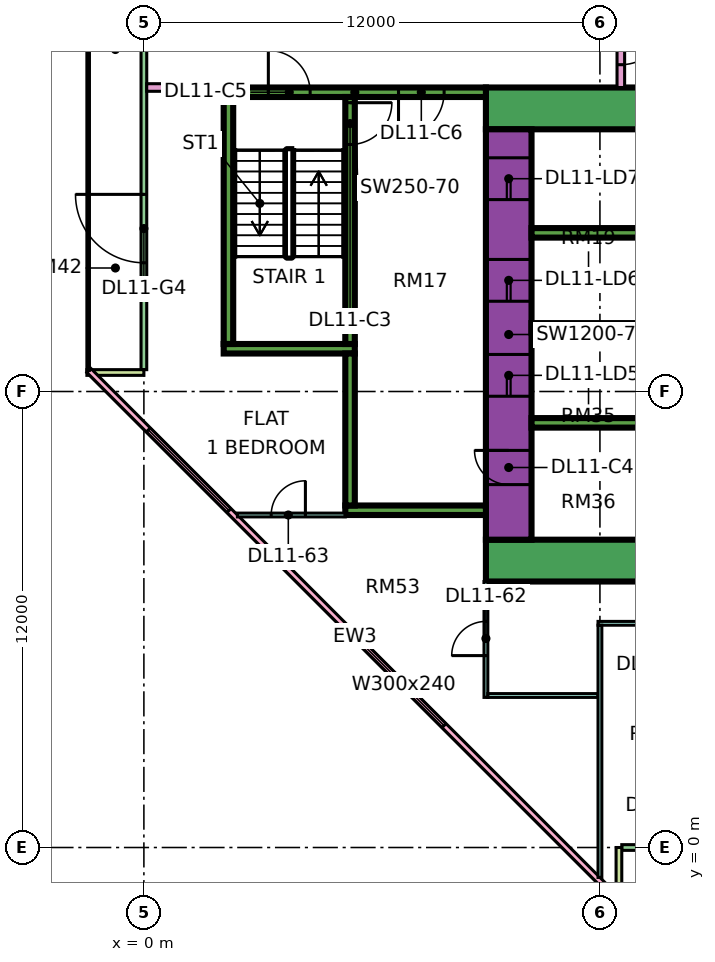
"""IFC4 building model, lengths in metres.
Left out: names, types, materials, properties, quantities, classifications, styles, units other than length and angle.
Written with IfcOpenShell. Run it as: python <this file> out.ifc"""

import sys

from ifc_helpers import new_model, si_unit, direction, frame, frame_2d, origin, place, context, subcontext, project, spatial, rectangle, extrude, element, fill, save


model = new_model("IFC4")
c1 = context("Model", 3, precision=1e-05, world=origin(), true_north=direction((0.0, 1.0)))
c2 = subcontext(c1, "Body", "Model", "MODEL_VIEW")
j1 = project(units=[si_unit("LENGTHUNIT", "METRE"), si_unit("PLANEANGLEUNIT", "RADIAN")], contexts=[c1])
p1 = place(None, origin())
s1 = spatial("IfcSite", under=j1, at=p1, CompositionType="ELEMENT")
p2 = place(p1, origin())
s2 = spatial("IfcBuilding", under=s1, at=p2, CompositionType="ELEMENT")
p3 = place(p2, frame((0.0, 0.0, 56.4)))
s3 = spatial("IfcBuildingStorey", under=s2, at=p3, CompositionType="ELEMENT", Elevation=56.4)
p4 = place(p3, frame((9.0, 7.55, 0.0), z_axis=(0.0, 0.0, 1.0), x_axis=(1.0, 0.0, 0.0)))
e1 = element("IfcWall", 1, at=p4, inside=s3, PredefinedType="SHEAR", context=c2, shape_type="SweptSolid", body=[
    extrude(rectangle(XDim=25.0, YDim=1.1, at=frame_2d((12.5, 0.0))), origin(), (0.0, 0.0, 1.0), 3.75),
])
p5 = place(p3, frame((9.0, 19.45, 0.0), z_axis=(0.0, 0.0, 1.0), x_axis=(1.0, 0.0, 0.0)))
e2 = element("IfcWall", 2, at=p5, inside=s3, PredefinedType="SHEAR", context=c2, shape_type="SweptSolid", body=[
    extrude(rectangle(XDim=25.0, YDim=1.1, at=frame_2d((12.5, 0.0))), origin(), (0.0, 0.0, 1.0), 3.75),
])
p6 = place(p5, frame((19.1, 0.0, 0.0)))
e3 = element("IfcOpeningElement", 3, at=p6, cuts=e2, PredefinedType="OPENING", context=c2, shape_type="SweptSolid", body=[
    extrude(rectangle(XDim=1.8, YDim=2.4, at=frame_2d((0.9, 1.2))), frame((0.0, 0.56, 0.0), z_axis=(0.0, -1.0, 0.0), x_axis=(1.0, 0.0, 0.0)), (0.0, 0.0, 1.0), 1.12),
])
p7 = place(p3, frame((9.6, 8.1, 0.0), z_axis=(0.0, 0.0, 1.0), x_axis=(0.0, 1.0, 0.0)))
e4 = element("IfcWall", 4, at=p7, inside=s3, PredefinedType="SHEAR", context=c2, shape_type="SweptSolid", body=[
    extrude(rectangle(XDim=10.8, YDim=1.2, at=frame_2d((5.4, 0.0))), origin(), (0.0, 0.0, 1.0), 3.75),
])
p8 = place(p7, frame((3.775, 0.0, 0.0)))
e5 = element("IfcOpeningElement", 5, at=p8, cuts=e4, PredefinedType="OPENING", context=c2, shape_type="SweptSolid", body=[
    extrude(rectangle(XDim=1.1, YDim=2.2, at=frame_2d((0.55, 1.1))), frame((0.0, 0.61, 0.0), z_axis=(0.0, -1.0, 0.0), x_axis=(1.0, 0.0, 0.0)), (0.0, 0.0, 1.0), 1.22),
])
p9 = place(p7, frame((6.275, 0.0, 0.0)))
e6 = element("IfcOpeningElement", 6, at=p9, cuts=e4, PredefinedType="OPENING", context=c2, shape_type="SweptSolid", body=[
    extrude(rectangle(XDim=1.1, YDim=2.2, at=frame_2d((0.55, 1.1))), frame((0.0, 0.61, 0.0), z_axis=(0.0, -1.0, 0.0), x_axis=(1.0, 0.0, 0.0)), (0.0, 0.0, 1.0), 1.22),
])
p10 = place(p7, frame((8.95, 0.0, 0.0)))
e7 = element("IfcOpeningElement", 7, at=p10, cuts=e4, PredefinedType="OPENING", context=c2, shape_type="SweptSolid", body=[
    extrude(rectangle(XDim=1.1, YDim=2.2, at=frame_2d((0.55, 1.1))), frame((0.0, 0.61, 0.0), z_axis=(0.0, -1.0, 0.0), x_axis=(1.0, 0.0, 0.0)), (0.0, 0.0, 1.0), 1.22),
])
p11 = place(p7, frame((1.45, 0.0, 0.0)))
e8 = element("IfcOpeningElement", 8, at=p11, cuts=e4, PredefinedType="OPENING", context=c2, shape_type="SweptSolid", body=[
    extrude(rectangle(XDim=0.9, YDim=2.1, at=frame_2d((0.45, 1.05))), frame((0.0, 0.61, 0.0), z_axis=(0.0, -1.0, 0.0), x_axis=(1.0, 0.0, 0.0)), (0.0, 0.0, 1.0), 1.22),
])
for number, where, z_axis, x_axis in (
    (9, (10.2, 11.175, 0.0), (0.0, 0.0, 1.0), (1.0, 0.0, 0.0)),
    (10, (10.2, 13.675, 0.0), (0.0, 0.0, 1.0), (1.0, 0.0, 0.0)),
    (11, (10.2, 16.175, 0.0), (0.0, 0.0, 1.0), (1.0, 0.0, 0.0)),
):
    element("IfcWall", number, at=place(p3, frame(where, z_axis=z_axis, x_axis=x_axis)), inside=s3, PredefinedType="SHEAR", context=c2, shape_type="SweptSolid", body=[
        extrude(rectangle(XDim=3.0, YDim=0.25, at=frame_2d((1.5, 0.0))), origin(), (0.0, 0.0, 1.0), 3.75),
    ])
p12 = place(p3, frame((2.1, 19.875, 0.0), z_axis=(0.0, 0.0, 1.0), x_axis=(1.0, 0.0, 0.0)))
e12 = element("IfcWall", 12, at=p12, inside=s3, PredefinedType="SHEAR", context=c2, shape_type="SweptSolid", body=[
    extrude(rectangle(XDim=6.9, YDim=0.25, at=frame_2d((3.45, 0.0))), origin(), (0.0, 0.0, 1.0), 3.75),
])
p13 = place(p12, frame((1.175, 0.0, 0.0)))
e13 = element("IfcOpeningElement", 13, at=p13, cuts=e12, PredefinedType="OPENING", context=c2, shape_type="SweptSolid", body=[
    extrude(rectangle(XDim=1.1, YDim=2.2, at=frame_2d((0.55, 1.1))), frame((0.0, 0.135, 0.0), z_axis=(0.0, -1.0, 0.0), x_axis=(1.0, 0.0, 0.0)), (0.0, 0.0, 1.0), 0.27),
])
p14 = place(p12, frame((4.6, 0.0, 0.0)))
e14 = element("IfcOpeningElement", 14, at=p14, cuts=e12, PredefinedType="OPENING", context=c2, shape_type="SweptSolid", body=[
    extrude(rectangle(XDim=1.2, YDim=2.2, at=frame_2d((0.6, 1.1))), frame((0.0, 0.135, 0.0), z_axis=(0.0, -1.0, 0.0), x_axis=(1.0, 0.0, 0.0)), (0.0, 0.0, 1.0), 0.27),
])
p15 = place(p3, frame((2.1, 13.125, 0.0), z_axis=(0.0, 0.0, 1.0), x_axis=(1.0, 0.0, 0.0)))
e15 = element("IfcWall", 15, at=p15, inside=s3, PredefinedType="SHEAR", context=c2, shape_type="SweptSolid", body=[
    extrude(rectangle(XDim=3.45, YDim=0.25, at=frame_2d((1.725, 0.0))), origin(), (0.0, 0.0, 1.0), 3.75),
])
p16 = place(p3, frame((2.225, 13.25, 0.0), z_axis=(0.0, 0.0, 1.0), x_axis=(0.0, 1.0, 0.0)))
e16 = element("IfcWall", 16, at=p16, inside=s3, PredefinedType="SHEAR", context=c2, shape_type="SweptSolid", body=[
    extrude(rectangle(XDim=6.5, YDim=0.25, at=frame_2d((3.25, 0.0))), origin(), (0.0, 0.0, 1.0), 3.75),
])
p17 = place(p3, frame((5.425, 13.25, 0.0), z_axis=(0.0, 0.0, 1.0), x_axis=(0.0, 1.0, 0.0)))
e17 = element("IfcWall", 17, at=p17, inside=s3, PredefinedType="SHEAR", context=c2, shape_type="SweptSolid", body=[
    extrude(rectangle(XDim=6.5, YDim=0.25, at=frame_2d((3.25, 0.0))), origin(), (0.0, 0.0, 1.0), 3.75),
])
p18 = place(p17, frame((5.25, 0.0, 0.0)))
e18 = element("IfcOpeningElement", 18, at=p18, cuts=e17, PredefinedType="OPENING", context=c2, shape_type="SweptSolid", body=[
    extrude(rectangle(XDim=1.1, YDim=2.2, at=frame_2d((0.55, 1.1))), frame((0.0, 0.135, 0.0), z_axis=(0.0, -1.0, 0.0), x_axis=(1.0, 0.0, 0.0)), (0.0, 0.0, 1.0), 0.27),
])
p19 = place(p3, frame((5.3, 8.875, 0.0), z_axis=(0.0, 0.0, 1.0), x_axis=(1.0, 0.0, 0.0)))
e19 = element("IfcWall", 19, at=p19, inside=s3, PredefinedType="SHEAR", context=c2, shape_type="SweptSolid", body=[
    extrude(rectangle(XDim=3.7, YDim=0.25, at=frame_2d((1.85, 0.0))), origin(), (0.0, 0.0, 1.0), 3.75),
])
p20 = place(p3, frame((5.425, 9.0, 0.0), z_axis=(0.0, 0.0, 1.0), x_axis=(0.0, 1.0, 0.0)))
e20 = element("IfcWall", 20, at=p20, inside=s3, PredefinedType="SHEAR", context=c2, shape_type="SweptSolid", body=[
    extrude(rectangle(XDim=4.0, YDim=0.25, at=frame_2d((2.0, 0.0))), origin(), (0.0, 0.0, 1.0), 3.75),
])
p21 = place(p3, frame((0.0, 23.925, 0.0), z_axis=(0.0, 0.0, 1.0), x_axis=(0.0, -1.0, 0.0)))
e21 = element("IfcWall", 21, at=p21, inside=s3, PredefinedType="SOLIDWALL", context=c2, shape_type="SweptSolid", body=[
    extrude(rectangle(XDim=11.35, YDim=0.15, at=frame_2d((5.675, 0.0))), origin(), (0.0, 0.0, 1.0), 3.35),
])
p22 = place(p21, frame((6.738, 0.0, 0.0)))
e22 = element("IfcOpeningElement", 22, at=p22, cuts=e21, PredefinedType="OPENING", context=c2, shape_type="SweptSolid", body=[
    extrude(rectangle(XDim=1.8, YDim=2.4, at=frame_2d((0.9, 1.2))), frame((0.0, 0.085, 0.0), z_axis=(0.0, -1.0, 0.0), x_axis=(1.0, 0.0, 0.0)), (0.0, 0.0, 1.0), 0.17),
])
p23 = place(p3, frame((-1.5, 12.5, 0.0), z_axis=(0.0, 0.0, 1.0), x_axis=(1.0, 0.0, 0.0)))
e23 = element("IfcWall", 23, at=p23, inside=s3, PredefinedType="SOLIDWALL", context=c2, shape_type="SweptSolid", body=[
    extrude(rectangle(XDim=1.5, YDim=0.15, at=frame_2d((0.75, 0.0))), origin(), (0.0, 0.0, 1.0), 3.35),
])
p24 = place(p3, frame((-1.447, 12.553, 0.0), z_axis=(0.0, 0.0, 1.0), x_axis=(0.707106781187, -0.707106781187, 0.0)))
e24 = element("IfcWall", 24, at=p24, inside=s3, PredefinedType="SOLIDWALL", context=c2, shape_type="SweptSolid", body=[
    extrude(rectangle(XDim=19.799, YDim=0.15, at=frame_2d((9.899, 0.0))), origin(), (0.0, 0.0, 1.0), 3.35),
])
p25 = place(p24, frame((2.212, 0.0, 0.45)))
e25 = element("IfcOpeningElement", 25, at=p25, cuts=e24, PredefinedType="OPENING", context=c2, shape_type="SweptSolid", body=[
    extrude(rectangle(XDim=3.0, YDim=2.4, at=frame_2d((1.5, 1.2))), frame((0.0, 0.085, 0.0), z_axis=(0.0, -1.0, 0.0), x_axis=(1.0, 0.0, 0.0)), (0.0, 0.0, 1.0), 0.17),
])
p26 = place(p24, frame((10.216, 0.0, 0.45)))
e26 = element("IfcOpeningElement", 26, at=p26, cuts=e24, PredefinedType="OPENING", context=c2, shape_type="SweptSolid", body=[
    extrude(rectangle(XDim=3.0, YDim=2.4, at=frame_2d((1.5, 1.2))), frame((0.0, 0.085, 0.0), z_axis=(0.0, -1.0, 0.0), x_axis=(1.0, 0.0, 0.0)), (0.0, 0.0, 1.0), 0.17),
])
p27 = place(p3, frame((12.575, 0.0, 0.0), z_axis=(0.0, 0.0, 1.0), x_axis=(1.0, 0.0, 0.0)))
e27 = element("IfcWall", 27, at=p27, inside=s3, PredefinedType="SOLIDWALL", context=c2, shape_type="SweptSolid", body=[
    extrude(rectangle(XDim=11.35, YDim=0.15, at=frame_2d((5.675, 0.0))), origin(), (0.0, 0.0, 1.0), 3.35),
])
p28 = place(p27, frame((0.613, 0.0, 0.0)))
e28 = element("IfcOpeningElement", 28, at=p28, cuts=e27, PredefinedType="OPENING", context=c2, shape_type="SweptSolid", body=[
    extrude(rectangle(XDim=1.2, YDim=2.4, at=frame_2d((0.6, 1.2))), frame((0.0, 0.085, 0.0), z_axis=(0.0, -1.0, 0.0), x_axis=(1.0, 0.0, 0.0)), (0.0, 0.0, 1.0), 0.17),
])
p29 = place(p27, frame((3.025, 0.0, 0.45)))
e29 = element("IfcOpeningElement", 29, at=p29, cuts=e27, PredefinedType="OPENING", context=c2, shape_type="SweptSolid", body=[
    extrude(rectangle(XDim=1.8, YDim=2.4, at=frame_2d((0.9, 1.2))), frame((0.0, 0.085, 0.0), z_axis=(0.0, -1.0, 0.0), x_axis=(1.0, 0.0, 0.0)), (0.0, 0.0, 1.0), 0.17),
])
p30 = place(p27, frame((6.025, 0.0, 0.45)))
e30 = element("IfcOpeningElement", 30, at=p30, cuts=e27, PredefinedType="OPENING", context=c2, shape_type="SweptSolid", body=[
    extrude(rectangle(XDim=1.8, YDim=2.4, at=frame_2d((0.9, 1.2))), frame((0.0, 0.085, 0.0), z_axis=(0.0, -1.0, 0.0), x_axis=(1.0, 0.0, 0.0)), (0.0, 0.0, 1.0), 0.17),
])
p31 = place(p27, frame((9.0, 0.0, 0.45)))
e31 = element("IfcOpeningElement", 31, at=p31, cuts=e27, PredefinedType="OPENING", context=c2, shape_type="SweptSolid", body=[
    extrude(rectangle(XDim=1.2, YDim=2.4, at=frame_2d((0.6, 1.2))), frame((0.0, 0.085, 0.0), z_axis=(0.0, -1.0, 0.0), x_axis=(1.0, 0.0, 0.0)), (0.0, 0.0, 1.0), 0.17),
])
p32 = place(p3, frame((12.5, -1.5, 0.0), z_axis=(0.0, 0.0, 1.0), x_axis=(0.0, 1.0, 0.0)))
e32 = element("IfcWall", 32, at=p32, inside=s3, PredefinedType="SOLIDWALL", context=c2, shape_type="SweptSolid", body=[
    extrude(rectangle(XDim=1.5, YDim=0.15, at=frame_2d((0.75, 0.0))), origin(), (0.0, 0.0, 1.0), 3.35),
])
p33 = place(p3, frame((0.074, 20.0, 0.0), z_axis=(0.0, 0.0, 1.0), x_axis=(1.0, 0.0, 0.0)))
e33 = element("IfcWall", 33, at=p33, inside=s3, PredefinedType="PARTITIONING", context=c2, shape_type="SweptSolid", body=[
    extrude(rectangle(XDim=2.026, YDim=0.2, at=frame_2d((1.013, 0.0))), origin(), (0.0, 0.0, 1.0), 3.35),
])
p34 = place(p3, frame((2.461, 8.75, 0.0), z_axis=(0.0, 0.0, 1.0), x_axis=(1.0, 0.0, 0.0)))
e34 = element("IfcWall", 34, at=p34, inside=s3, PredefinedType="PARTITIONING", context=c2, shape_type="SweptSolid", body=[
    extrude(rectangle(XDim=2.839, YDim=0.1, at=frame_2d((1.419, 0.0))), origin(), (0.0, 0.0, 1.0), 3.35),
])
p35 = place(p34, frame((0.889, 0.0, 0.0)))
e35 = element("IfcOpeningElement", 35, at=p35, cuts=e34, PredefinedType="OPENING", context=c2, shape_type="SweptSolid", body=[
    extrude(rectangle(XDim=0.9, YDim=2.1, at=frame_2d((0.45, 1.05))), frame((0.0, 0.06, 0.0), z_axis=(0.0, -1.0, 0.0), x_axis=(1.0, 0.0, 0.0)), (0.0, 0.0, 1.0), 0.12),
])
p36 = place(p3, frame((9.0, 3.95, 0.0), z_axis=(0.0, 0.0, 1.0), x_axis=(0.0, 1.0, 0.0)))
e36 = element("IfcWall", 36, at=p36, inside=s3, PredefinedType="PARTITIONING", context=c2, shape_type="SweptSolid", body=[
    extrude(rectangle(XDim=3.05, YDim=0.1, at=frame_2d((1.525, 0.0))), origin(), (0.0, 0.0, 1.0), 3.35),
])
p37 = place(p36, frame((1.1, 0.0, 0.0)))
e37 = element("IfcOpeningElement", 37, at=p37, cuts=e36, PredefinedType="OPENING", context=c2, shape_type="SweptSolid", body=[
    extrude(rectangle(XDim=0.9, YDim=2.1, at=frame_2d((0.45, 1.05))), frame((0.0, 0.06, 0.0), z_axis=(0.0, -1.0, 0.0), x_axis=(1.0, 0.0, 0.0)), (0.0, 0.0, 1.0), 0.12),
])
p38 = place(p3, frame((9.05, 4.0, 0.0), z_axis=(0.0, 0.0, 1.0), x_axis=(1.0, 0.0, 0.0)))
e38 = element("IfcWall", 38, at=p38, inside=s3, PredefinedType="PARTITIONING", context=c2, shape_type="SweptSolid", body=[
    extrude(rectangle(XDim=2.9, YDim=0.1, at=frame_2d((1.45, 0.0))), origin(), (0.0, 0.0, 1.0), 3.35),
])
p39 = place(p3, frame((11.95, 5.9, 0.0), z_axis=(0.0, 0.0, 1.0), x_axis=(1.0, 0.0, 0.0)))
e39 = element("IfcWall", 39, at=p39, inside=s3, PredefinedType="PARTITIONING", context=c2, shape_type="SweptSolid", body=[
    extrude(rectangle(XDim=21.1, YDim=0.1, at=frame_2d((10.55, 0.0))), origin(), (0.0, 0.0, 1.0), 3.35),
])
p40 = place(p39, frame((1.1, 0.0, 0.0)))
e40 = element("IfcOpeningElement", 40, at=p40, cuts=e39, PredefinedType="OPENING", context=c2, shape_type="SweptSolid", body=[
    extrude(rectangle(XDim=0.9, YDim=2.1, at=frame_2d((0.45, 1.05))), frame((0.0, 0.06, 0.0), z_axis=(0.0, -1.0, 0.0), x_axis=(1.0, 0.0, 0.0)), (0.0, 0.0, 1.0), 0.12),
])
p41 = place(p39, frame((4.1, 0.0, 0.0)))
e41 = element("IfcOpeningElement", 41, at=p41, cuts=e39, PredefinedType="OPENING", context=c2, shape_type="SweptSolid", body=[
    extrude(rectangle(XDim=0.9, YDim=2.1, at=frame_2d((0.45, 1.05))), frame((0.0, 0.06, 0.0), z_axis=(0.0, -1.0, 0.0), x_axis=(1.0, 0.0, 0.0)), (0.0, 0.0, 1.0), 0.12),
])
p42 = place(p39, frame((7.1, 0.0, 0.0)))
e42 = element("IfcOpeningElement", 42, at=p42, cuts=e39, PredefinedType="OPENING", context=c2, shape_type="SweptSolid", body=[
    extrude(rectangle(XDim=0.9, YDim=2.1, at=frame_2d((0.45, 1.05))), frame((0.0, 0.06, 0.0), z_axis=(0.0, -1.0, 0.0), x_axis=(1.0, 0.0, 0.0)), (0.0, 0.0, 1.0), 0.12),
])
p43 = place(p39, frame((10.1, 0.0, 0.0)))
e43 = element("IfcOpeningElement", 43, at=p43, cuts=e39, PredefinedType="OPENING", context=c2, shape_type="SweptSolid", body=[
    extrude(rectangle(XDim=0.9, YDim=2.1, at=frame_2d((0.45, 1.05))), frame((0.0, 0.06, 0.0), z_axis=(0.0, -1.0, 0.0), x_axis=(1.0, 0.0, 0.0)), (0.0, 0.0, 1.0), 0.12),
])
p44 = place(p39, frame((16.1, 0.0, 0.0)))
e44 = element("IfcOpeningElement", 44, at=p44, cuts=e39, PredefinedType="OPENING", context=c2, shape_type="SweptSolid", body=[
    extrude(rectangle(XDim=0.9, YDim=2.1, at=frame_2d((0.45, 1.05))), frame((0.0, 0.06, 0.0), z_axis=(0.0, -1.0, 0.0), x_axis=(1.0, 0.0, 0.0)), (0.0, 0.0, 1.0), 0.12),
])
p45 = place(p3, frame((12.0, -0.788, 0.0), z_axis=(0.0, 0.0, 1.0), x_axis=(0.0, 1.0, 0.0)))
e45 = element("IfcWall", 45, at=p45, inside=s3, PredefinedType="PARTITIONING", context=c2, shape_type="SweptSolid", body=[
    extrude(rectangle(XDim=6.638, YDim=0.1, at=frame_2d((3.319, 0.0))), origin(), (0.0, 0.0, 1.0), 3.35),
])
p46 = place(p3, frame((12.55, 20.0, 0.0), z_axis=(0.0, 0.0, 1.0), x_axis=(0.0, 1.0, 0.0)))
e46 = element("IfcWall", 46, at=p46, inside=s3, PredefinedType="PARTITIONING", context=c2, shape_type="SweptSolid", body=[
    extrude(rectangle(XDim=42.926, YDim=0.2, at=frame_2d((21.463, 0.0))), origin(), (0.0, 0.0, 1.0), 3.35),
])
p47 = place(p46, frame((40.65, 0.0, 0.0)))
e47 = element("IfcOpeningElement", 47, at=p47, cuts=e46, PredefinedType="OPENING", context=c2, shape_type="SweptSolid", body=[
    extrude(rectangle(XDim=1.0, YDim=2.1, at=frame_2d((0.5, 1.05))), frame((0.0, 0.11, 0.0), z_axis=(0.0, -1.0, 0.0), x_axis=(1.0, 0.0, 0.0)), (0.0, 0.0, 1.0), 0.22),
])
p48 = place(p46, frame((0.6, 0.0, 0.0)))
e48 = element("IfcOpeningElement", 48, at=p48, cuts=e46, PredefinedType="OPENING", context=c2, shape_type="SweptSolid", body=[
    extrude(rectangle(XDim=1.2, YDim=2.1, at=frame_2d((0.6, 1.05))), frame((0.0, 0.11, 0.0), z_axis=(0.0, -1.0, 0.0), x_axis=(1.0, 0.0, 0.0)), (0.0, 0.0, 1.0), 0.22),
])
p49 = place(p46, frame((14.1, 0.0, 0.0)))
e49 = element("IfcOpeningElement", 49, at=p49, cuts=e46, PredefinedType="OPENING", context=c2, shape_type="SweptSolid", body=[
    extrude(rectangle(XDim=1.0, YDim=2.1, at=frame_2d((0.5, 1.05))), frame((0.0, 0.11, 0.0), z_axis=(0.0, -1.0, 0.0), x_axis=(1.0, 0.0, 0.0)), (0.0, 0.0, 1.0), 0.22),
])
p50 = place(p22, frame((1.8, 0.0, 0.0), z_axis=(0.0, 0.0, 1.0), x_axis=(-1.0, 0.0, 0.0)))
e50 = element("IfcDoor", 50, at=p50, inside=s3, OperationType="DOUBLE_DOOR_SINGLE_SWING", PredefinedType="DOOR", context=c2, shape_type="SweptSolid", body=[
    extrude(rectangle(XDim=1.8, YDim=2.4, at=frame_2d((0.9, 1.2))), frame((0.0, 0.025, 0.0), z_axis=(0.0, -1.0, 0.0), x_axis=(1.0, 0.0, 0.0)), (0.0, 0.0, 1.0), 0.05),
])
fill(e22, e50)
p51 = place(p25, origin())
e51 = element("IfcWindow", 51, at=p51, inside=s3, PartitioningType="SINGLE_PANEL", PredefinedType="WINDOW", context=c2, shape_type="SweptSolid", body=[
    extrude(rectangle(XDim=3.0, YDim=2.4, at=frame_2d((1.5, 1.2))), frame((0.0, 0.03, 0.0), z_axis=(0.0, -1.0, 0.0), x_axis=(1.0, 0.0, 0.0)), (0.0, 0.0, 1.0), 0.06),
])
fill(e25, e51)
p52 = place(p26, origin())
e52 = element("IfcWindow", 52, at=p52, inside=s3, PartitioningType="SINGLE_PANEL", PredefinedType="WINDOW", context=c2, shape_type="SweptSolid", body=[
    extrude(rectangle(XDim=3.0, YDim=2.4, at=frame_2d((1.5, 1.2))), frame((0.0, 0.03, 0.0), z_axis=(0.0, -1.0, 0.0), x_axis=(1.0, 0.0, 0.0)), (0.0, 0.0, 1.0), 0.06),
])
fill(e26, e52)
p53 = place(p8, origin())
e53 = element("IfcDoor", 53, at=p53, inside=s3, OperationType="DOUBLE_DOOR_SLIDING", PredefinedType="DOOR", context=c2, shape_type="SweptSolid", body=[
    extrude(rectangle(XDim=1.1, YDim=2.2, at=frame_2d((0.55, 1.1))), frame((0.0, 0.025, 0.0), z_axis=(0.0, -1.0, 0.0), x_axis=(1.0, 0.0, 0.0)), (0.0, 0.0, 1.0), 0.05),
])
fill(e5, e53)
p54 = place(p9, origin())
e54 = element("IfcDoor", 54, at=p54, inside=s3, OperationType="DOUBLE_DOOR_SLIDING", PredefinedType="DOOR", context=c2, shape_type="SweptSolid", body=[
    extrude(rectangle(XDim=1.1, YDim=2.2, at=frame_2d((0.55, 1.1))), frame((0.0, 0.025, 0.0), z_axis=(0.0, -1.0, 0.0), x_axis=(1.0, 0.0, 0.0)), (0.0, 0.0, 1.0), 0.05),
])
fill(e6, e54)
p55 = place(p10, origin())
e55 = element("IfcDoor", 55, at=p55, inside=s3, OperationType="DOUBLE_DOOR_SLIDING", PredefinedType="DOOR", context=c2, shape_type="SweptSolid", body=[
    extrude(rectangle(XDim=1.1, YDim=2.2, at=frame_2d((0.55, 1.1))), frame((0.0, 0.025, 0.0), z_axis=(0.0, -1.0, 0.0), x_axis=(1.0, 0.0, 0.0)), (0.0, 0.0, 1.0), 0.05),
])
fill(e7, e55)
p56 = place(p18, origin())
e56 = element("IfcDoor", 56, at=p56, inside=s3, OperationType="SINGLE_SWING_RIGHT", PredefinedType="DOOR", context=c2, shape_type="SweptSolid", body=[
    extrude(rectangle(XDim=1.1, YDim=2.2, at=frame_2d((0.55, 1.1))), frame((0.0, 0.025, 0.0), z_axis=(0.0, -1.0, 0.0), x_axis=(1.0, 0.0, 0.0)), (0.0, 0.0, 1.0), 0.05),
])
fill(e18, e56)
p57 = place(p11, frame((0.9, 0.0, 0.0), z_axis=(0.0, 0.0, 1.0), x_axis=(-1.0, 0.0, 0.0)))
e57 = element("IfcDoor", 57, at=p57, inside=s3, OperationType="SINGLE_SWING_RIGHT", PredefinedType="DOOR", context=c2, shape_type="SweptSolid", body=[
    extrude(rectangle(XDim=0.9, YDim=2.1, at=frame_2d((0.45, 1.05))), frame((0.0, 0.025, 0.0), z_axis=(0.0, -1.0, 0.0), x_axis=(1.0, 0.0, 0.0)), (0.0, 0.0, 1.0), 0.05),
])
fill(e8, e57)
p58 = place(p13, origin())
e58 = element("IfcDoor", 58, at=p58, inside=s3, OperationType="SINGLE_SWING_LEFT", PredefinedType="DOOR", context=c2, shape_type="SweptSolid", body=[
    extrude(rectangle(XDim=1.1, YDim=2.2, at=frame_2d((0.55, 1.1))), frame((0.0, 0.025, 0.0), z_axis=(0.0, -1.0, 0.0), x_axis=(1.0, 0.0, 0.0)), (0.0, 0.0, 1.0), 0.05),
])
fill(e13, e58)
p59 = place(p14, frame((1.2, 0.0, 0.0), z_axis=(0.0, 0.0, 1.0), x_axis=(-1.0, 0.0, 0.0)))
e59 = element("IfcDoor", 59, at=p59, inside=s3, OperationType="SINGLE_SWING_LEFT", PredefinedType="DOOR", context=c2, shape_type="SweptSolid", body=[
    extrude(rectangle(XDim=1.2, YDim=2.2, at=frame_2d((0.6, 1.1))), frame((0.0, 0.025, 0.0), z_axis=(0.0, -1.0, 0.0), x_axis=(1.0, 0.0, 0.0)), (0.0, 0.0, 1.0), 0.05),
])
fill(e14, e59)
p60 = place(p48, origin())
e60 = element("IfcDoor", 60, at=p60, inside=s3, OperationType="SINGLE_SWING_RIGHT", PredefinedType="DOOR", context=c2, shape_type="SweptSolid", body=[
    extrude(rectangle(XDim=1.2, YDim=2.1, at=frame_2d((0.6, 1.05))), frame((0.0, 0.025, 0.0), z_axis=(0.0, -1.0, 0.0), x_axis=(1.0, 0.0, 0.0)), (0.0, 0.0, 1.0), 0.05),
])
fill(e48, e60)
p61 = place(p37, origin())
e61 = element("IfcDoor", 61, at=p61, inside=s3, OperationType="SINGLE_SWING_LEFT", PredefinedType="DOOR", context=c2, shape_type="SweptSolid", body=[
    extrude(rectangle(XDim=0.9, YDim=2.1, at=frame_2d((0.45, 1.05))), frame((0.0, 0.025, 0.0), z_axis=(0.0, -1.0, 0.0), x_axis=(1.0, 0.0, 0.0)), (0.0, 0.0, 1.0), 0.05),
])
fill(e37, e61)
p62 = place(p35, frame((0.9, 0.0, 0.0), z_axis=(0.0, 0.0, 1.0), x_axis=(-1.0, 0.0, 0.0)))
e62 = element("IfcDoor", 62, at=p62, inside=s3, OperationType="SINGLE_SWING_RIGHT", PredefinedType="DOOR", context=c2, shape_type="SweptSolid", body=[
    extrude(rectangle(XDim=0.9, YDim=2.1, at=frame_2d((0.45, 1.05))), frame((0.0, 0.025, 0.0), z_axis=(0.0, -1.0, 0.0), x_axis=(1.0, 0.0, 0.0)), (0.0, 0.0, 1.0), 0.05),
])
fill(e35, e62)
save(model, sys.argv[1])
